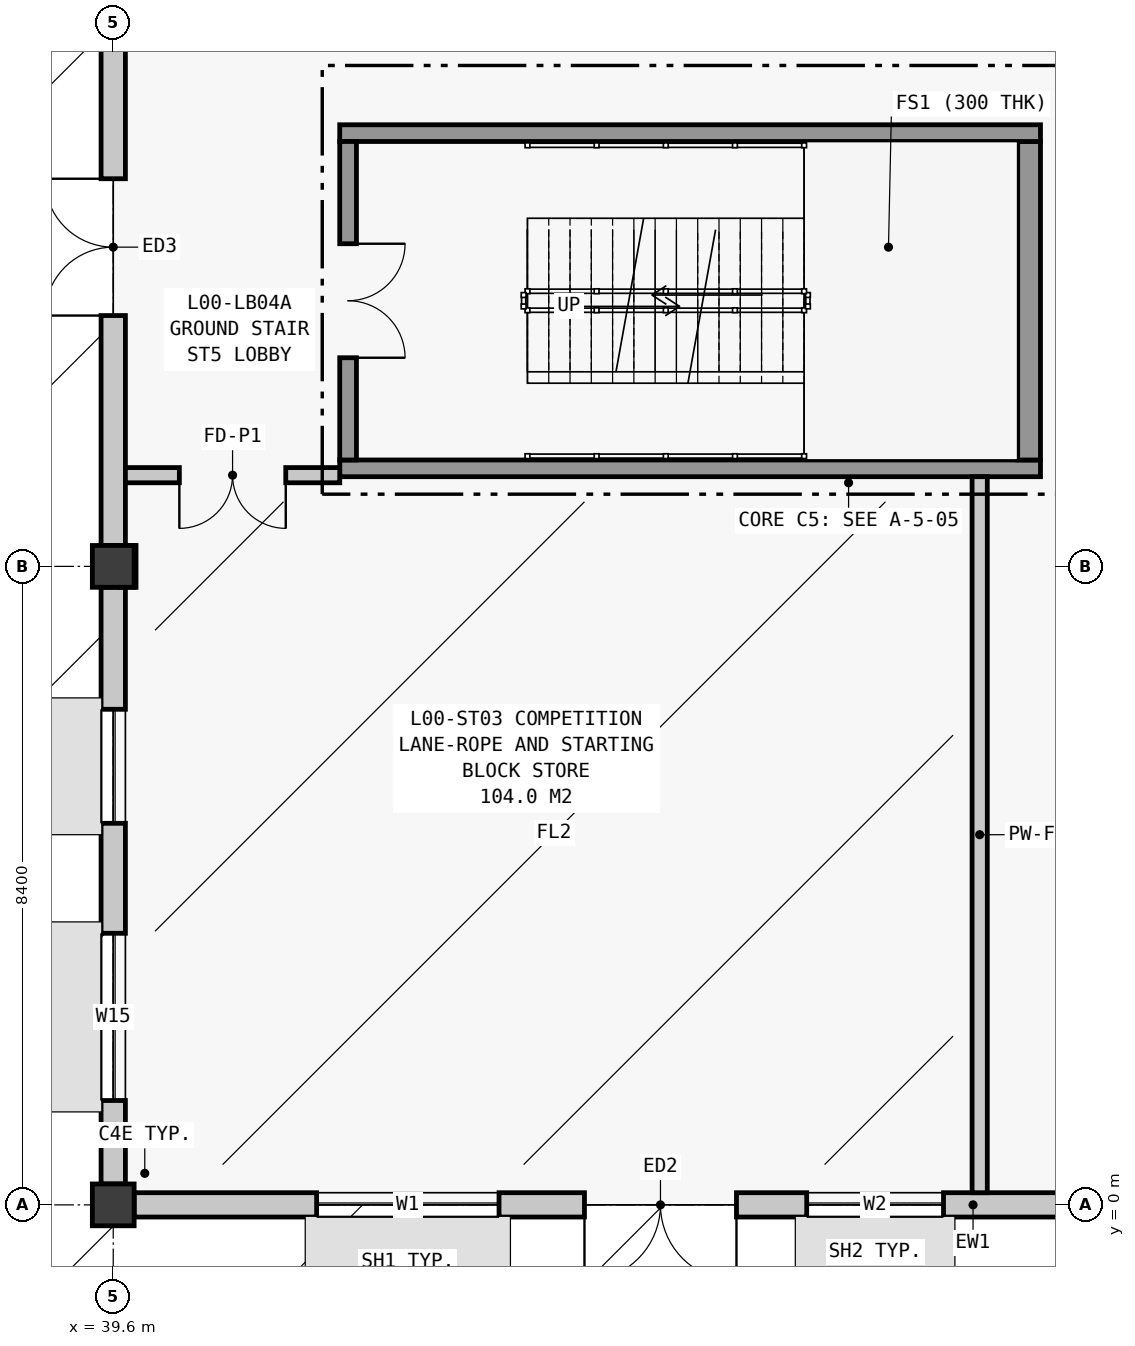
"""IFC4 building model, lengths in metres.
Left out: names, types, materials, properties, quantities, classifications, styles, units other than length and angle.
Written with IfcOpenShell. Run it as: python <this file> out.ifc"""

import sys

from ifc_helpers import new_model, si_unit, direction, frame, frame_2d, origin, origin_2d, place, context, subcontext, project, spatial, rectangle, extrude, element, fill, save


model = new_model("IFC4")
c1 = context("Model", 3, precision=1e-05, world=origin(), true_north=direction((0.0, 1.0)))
c2 = subcontext(c1, "Body", "Model", "MODEL_VIEW")
j1 = project(units=[si_unit("LENGTHUNIT", "METRE"), si_unit("PLANEANGLEUNIT", "RADIAN")], contexts=[c1])
p1 = place(None, origin())
s1 = spatial("IfcSite", under=j1, at=p1, CompositionType="ELEMENT")
p2 = place(p1, origin())
s2 = spatial("IfcBuilding", under=s1, at=p2, CompositionType="ELEMENT")
p3 = place(p2, origin())
s3 = spatial("IfcBuildingStorey", under=s2, at=p3, CompositionType="ELEMENT", Elevation=0.0)
for number, where, z_axis, x_axis in (
    (1, (39.6, 0.0, 0.0), (0.0, 0.0, 1.0), (1.0, 0.0, 0.0)),
    (2, (39.6, 8.4, 0.0), (0.0, 0.0, 1.0), (1.0, 0.0, 0.0)),
):
    element("IfcColumn", number, at=place(p3, frame(where, z_axis=z_axis, x_axis=x_axis)), inside=s3, PredefinedType="COLUMN", context=c2, shape_type="SweptSolid", body=[
        extrude(rectangle(XDim=0.55, YDim=0.55, at=origin_2d()), origin(), (0.0, 0.0, 1.0), 4.8),
    ])
p4 = place(p3, frame((39.875, 0.0, 0.0), z_axis=(0.0, 0.0, 1.0), x_axis=(1.0, 0.0, 0.0)))
e3 = element("IfcWall", 3, at=p4, inside=s3, PredefinedType="STANDARD", context=c2, shape_type="SweptSolid", body=[
    extrude(rectangle(XDim=13.85, YDim=0.32, at=frame_2d((6.925, 0.0))), origin(), (0.0, 0.0, 1.0), 3.833),
])
p5 = place(p4, frame((5.925, 0.0, 0.0)))
e4 = element("IfcOpeningElement", 4, at=p5, cuts=e3, PredefinedType="OPENING", context=c2, shape_type="SweptSolid", body=[
    extrude(rectangle(XDim=2.0, YDim=2.4, at=frame_2d((1.0, 1.2))), frame((0.0, 0.175, 0.0), z_axis=(0.0, -1.0, 0.0), x_axis=(1.0, 0.0, 0.0)), (0.0, 0.0, 1.0), 0.35),
])
p6 = place(p4, frame((2.401, 0.0, 0.9)))
e5 = element("IfcOpeningElement", 5, at=p6, cuts=e3, PredefinedType="OPENING", context=c2, shape_type="SweptSolid", body=[
    extrude(rectangle(XDim=2.4, YDim=1.8, at=frame_2d((1.2, 0.9))), frame((0.0, 0.175, 0.0), z_axis=(0.0, -1.0, 0.0), x_axis=(1.0, 0.0, 0.0)), (0.0, 0.0, 1.0), 0.35),
])
p7 = place(p4, frame((8.849, 0.0, 0.9)))
e6 = element("IfcOpeningElement", 6, at=p7, cuts=e3, PredefinedType="OPENING", context=c2, shape_type="SweptSolid", body=[
    extrude(rectangle(XDim=1.8, YDim=1.8, at=frame_2d((0.9, 0.9))), frame((0.0, 0.175, 0.0), z_axis=(0.0, -1.0, 0.0), x_axis=(1.0, 0.0, 0.0)), (0.0, 0.0, 1.0), 0.35),
])
p8 = place(p3, frame((39.6, 8.125, 0.0), z_axis=(0.0, 0.0, 1.0), x_axis=(0.0, -1.0, 0.0)))
e7 = element("IfcWall", 7, at=p8, inside=s3, PredefinedType="STANDARD", context=c2, shape_type="SweptSolid", body=[
    extrude(rectangle(XDim=7.85, YDim=0.32, at=frame_2d((3.925, 0.0))), origin(), (0.0, 0.0, 1.0), 3.976),
])
p9 = place(p8, frame((1.605, 0.0, 1.05)))
e8 = element("IfcOpeningElement", 8, at=p9, cuts=e7, PredefinedType="OPENING", context=c2, shape_type="SweptSolid", body=[
    extrude(rectangle(XDim=1.5, YDim=1.5, at=frame_2d((0.75, 0.75))), frame((0.0, 0.175, 0.0), z_axis=(0.0, -1.0, 0.0), x_axis=(1.0, 0.0, 0.0)), (0.0, 0.0, 1.0), 0.35),
])
p10 = place(p8, frame((4.552, 0.0, 0.95)))
e9 = element("IfcOpeningElement", 9, at=p10, cuts=e7, PredefinedType="OPENING", context=c2, shape_type="SweptSolid", body=[
    extrude(rectangle(XDim=2.2, YDim=1.65, at=frame_2d((1.1, 0.825))), frame((0.0, 0.175, 0.0), z_axis=(0.0, -1.0, 0.0), x_axis=(1.0, 0.0, 0.0)), (0.0, 0.0, 1.0), 0.35),
])
p11 = place(p3, frame((39.6, 16.525, 0.0), z_axis=(0.0, 0.0, 1.0), x_axis=(0.0, -1.0, 0.0)))
e10 = element("IfcWall", 10, at=p11, inside=s3, PredefinedType="STANDARD", context=c2, shape_type="SweptSolid", body=[
    extrude(rectangle(XDim=7.85, YDim=0.32, at=frame_2d((3.925, 0.0))), origin(), (0.0, 0.0, 1.0), 3.976),
])
p12 = place(p11, frame((3.025, 0.0, 0.0)))
e11 = element("IfcOpeningElement", 11, at=p12, cuts=e10, PredefinedType="OPENING", context=c2, shape_type="SweptSolid", body=[
    extrude(rectangle(XDim=1.8, YDim=2.2, at=frame_2d((0.9, 1.1))), frame((0.0, 0.175, 0.0), z_axis=(0.0, -1.0, 0.0), x_axis=(1.0, 0.0, 0.0)), (0.0, 0.0, 1.0), 0.35),
])
p13 = place(p3, frame((42.58, 9.69, 0.0), z_axis=(0.0, 0.0, 1.0), x_axis=(1.0, 0.0, 0.0)))
e12 = element("IfcWall", 12, at=p13, inside=s3, PredefinedType="SOLIDWALL", context=c2, shape_type="SweptSolid", body=[
    extrude(rectangle(XDim=9.22, YDim=0.22, at=frame_2d((4.61, 0.0))), origin(), (0.0, 0.0, 1.0), 4.52),
])
p14 = place(p3, frame((51.65, 9.8, 0.0), z_axis=(0.0, 0.0, 1.0), x_axis=(0.0, 1.0, 0.0)))
e13 = element("IfcWall", 13, at=p14, inside=s3, PredefinedType="SHEAR", context=c2, shape_type="SweptSolid", body=[
    extrude(rectangle(XDim=4.19, YDim=0.3, at=frame_2d((2.095, 0.0))), origin(), (0.0, 0.0, 1.0), 4.52),
])
p15 = place(p3, frame((51.8, 14.1, 0.0), z_axis=(0.0, 0.0, 1.0), x_axis=(-1.0, 0.0, 0.0)))
e14 = element("IfcWall", 14, at=p15, inside=s3, PredefinedType="SOLIDWALL", context=c2, shape_type="SweptSolid", body=[
    extrude(rectangle(XDim=9.22, YDim=0.22, at=frame_2d((4.61, 0.0))), origin(), (0.0, 0.0, 1.0), 4.52),
])
p16 = place(p3, frame((42.69, 13.99, 0.0), z_axis=(0.0, 0.0, 1.0), x_axis=(0.0, -1.0, 0.0)))
e15 = element("IfcWall", 15, at=p16, inside=s3, PredefinedType="SOLIDWALL", context=c2, shape_type="SweptSolid", body=[
    extrude(rectangle(XDim=4.19, YDim=0.22, at=frame_2d((2.095, 0.0))), origin(), (0.0, 0.0, 1.0), 4.52),
])
p17 = place(p16, frame((1.345, 0.0, 0.0)))
e16 = element("IfcOpeningElement", 16, at=p17, cuts=e15, PredefinedType="OPENING", context=c2, shape_type="SweptSolid", body=[
    extrude(rectangle(XDim=1.5, YDim=2.2, at=frame_2d((0.75, 1.1))), frame((0.0, 0.125, 0.0), z_axis=(0.0, -1.0, 0.0), x_axis=(1.0, 0.0, 0.0)), (0.0, 0.0, 1.0), 0.25),
])
p18 = place(p3, frame((39.76, 9.6, 0.0), z_axis=(0.0, 0.0, 1.0), x_axis=(1.0, 0.0, 0.0)))
e17 = element("IfcWall", 17, at=p18, inside=s3, PredefinedType="PARTITIONING", context=c2, shape_type="SweptSolid", body=[
    extrude(rectangle(XDim=2.82, YDim=0.2, at=frame_2d((1.41, 0.0))), origin(), (0.0, 0.0, 1.0), 4.52),
])
p19 = place(p18, frame((0.71, 0.0, 0.0)))
e18 = element("IfcOpeningElement", 18, at=p19, cuts=e17, PredefinedType="OPENING", context=c2, shape_type="SweptSolid", body=[
    extrude(rectangle(XDim=1.4, YDim=2.2, at=frame_2d((0.7, 1.1))), frame((0.0, 0.115, 0.0), z_axis=(0.0, -1.0, 0.0), x_axis=(1.0, 0.0, 0.0)), (0.0, 0.0, 1.0), 0.23),
])
p20 = place(p3, frame((39.8, 8.125, 0.0), z_axis=(0.0, 0.0, 1.0), x_axis=(0.0, 1.0, 0.0)))
e19 = element("IfcWall", 19, at=p20, inside=s3, PredefinedType="PARTITIONING", context=c2, shape_type="SweptSolid", body=[
    extrude(rectangle(XDim=0.55, YDim=0.2, at=frame_2d((0.275, 0.0))), origin(), (0.0, 0.0, 1.0), 4.52),
])
p21 = place(p3, frame((51.0, 0.16, 0.0), z_axis=(0.0, 0.0, 1.0), x_axis=(0.0, 1.0, 0.0)))
e20 = element("IfcWall", 20, at=p21, inside=s3, PredefinedType="PARTITIONING", context=c2, shape_type="SweptSolid", body=[
    extrude(rectangle(XDim=9.42, YDim=0.2, at=frame_2d((4.71, 0.0))), origin(), (0.0, 0.0, 1.0), 4.52),
])
p22 = place(p5, frame((2.0, 0.0, 0.0), z_axis=(0.0, 0.0, 1.0), x_axis=(-1.0, 0.0, 0.0)))
e21 = element("IfcDoor", 21, at=p22, inside=s3, OperationType="DOUBLE_DOOR_SINGLE_SWING", PredefinedType="DOOR", context=c2, shape_type="SweptSolid", body=[
    extrude(rectangle(XDim=2.0, YDim=2.4, at=frame_2d((1.0, 1.2))), frame((0.0, 0.025, 0.0), z_axis=(0.0, -1.0, 0.0), x_axis=(1.0, 0.0, 0.0)), (0.0, 0.0, 1.0), 0.05),
])
fill(e4, e21)
p23 = place(p6, origin())
e22 = element("IfcWindow", 22, at=p23, inside=s3, PartitioningType="SINGLE_PANEL", PredefinedType="WINDOW", context=c2, shape_type="SweptSolid", body=[
    extrude(rectangle(XDim=2.4, YDim=1.8, at=frame_2d((1.2, 0.9))), frame((0.0, 0.03, 0.0), z_axis=(0.0, -1.0, 0.0), x_axis=(1.0, 0.0, 0.0)), (0.0, 0.0, 1.0), 0.06),
])
fill(e5, e22)
p24 = place(p7, origin())
e23 = element("IfcWindow", 23, at=p24, inside=s3, PartitioningType="SINGLE_PANEL", PredefinedType="WINDOW", context=c2, shape_type="SweptSolid", body=[
    extrude(rectangle(XDim=1.8, YDim=1.8, at=frame_2d((0.9, 0.9))), frame((0.0, 0.03, 0.0), z_axis=(0.0, -1.0, 0.0), x_axis=(1.0, 0.0, 0.0)), (0.0, 0.0, 1.0), 0.06),
])
fill(e6, e23)
p25 = place(p9, origin())
e24 = element("IfcWindow", 24, at=p25, inside=s3, PartitioningType="SINGLE_PANEL", PredefinedType="WINDOW", context=c2, shape_type="SweptSolid", body=[
    extrude(rectangle(XDim=1.5, YDim=1.5, at=frame_2d((0.75, 0.75))), frame((0.0, 0.03, 0.0), z_axis=(0.0, -1.0, 0.0), x_axis=(1.0, 0.0, 0.0)), (0.0, 0.0, 1.0), 0.06),
])
fill(e8, e24)
p26 = place(p10, origin())
e25 = element("IfcWindow", 25, at=p26, inside=s3, PartitioningType="SINGLE_PANEL", PredefinedType="WINDOW", context=c2, shape_type="SweptSolid", body=[
    extrude(rectangle(XDim=2.2, YDim=1.65, at=frame_2d((1.1, 0.825))), frame((0.0, 0.03, 0.0), z_axis=(0.0, -1.0, 0.0), x_axis=(1.0, 0.0, 0.0)), (0.0, 0.0, 1.0), 0.06),
])
fill(e9, e25)
p27 = place(p12, frame((1.8, 0.0, 0.0), z_axis=(0.0, 0.0, 1.0), x_axis=(-1.0, 0.0, 0.0)))
e26 = element("IfcDoor", 26, at=p27, inside=s3, OperationType="DOUBLE_DOOR_SINGLE_SWING", PredefinedType="DOOR", context=c2, shape_type="SweptSolid", body=[
    extrude(rectangle(XDim=1.8, YDim=2.2, at=frame_2d((0.9, 1.1))), frame((0.0, 0.025, 0.0), z_axis=(0.0, -1.0, 0.0), x_axis=(1.0, 0.0, 0.0)), (0.0, 0.0, 1.0), 0.05),
])
fill(e11, e26)
p28 = place(p17, origin())
e27 = element("IfcDoor", 27, at=p28, inside=s3, OperationType="DOUBLE_DOOR_SINGLE_SWING", PredefinedType="DOOR", context=c2, shape_type="SweptSolid", body=[
    extrude(rectangle(XDim=1.5, YDim=2.2, at=frame_2d((0.75, 1.1))), frame((0.0, 0.025, 0.0), z_axis=(0.0, -1.0, 0.0), x_axis=(1.0, 0.0, 0.0)), (0.0, 0.0, 1.0), 0.05),
])
fill(e16, e27)
p29 = place(p19, frame((1.4, 0.0, 0.0), z_axis=(0.0, 0.0, 1.0), x_axis=(-1.0, 0.0, 0.0)))
e28 = element("IfcDoor", 28, at=p29, inside=s3, OperationType="DOUBLE_DOOR_SINGLE_SWING", PredefinedType="DOOR", context=c2, shape_type="SweptSolid", body=[
    extrude(rectangle(XDim=1.4, YDim=2.2, at=frame_2d((0.7, 1.1))), frame((0.0, 0.025, 0.0), z_axis=(0.0, -1.0, 0.0), x_axis=(1.0, 0.0, 0.0)), (0.0, 0.0, 1.0), 0.05),
])
fill(e18, e28)
save(model, sys.argv[1])
